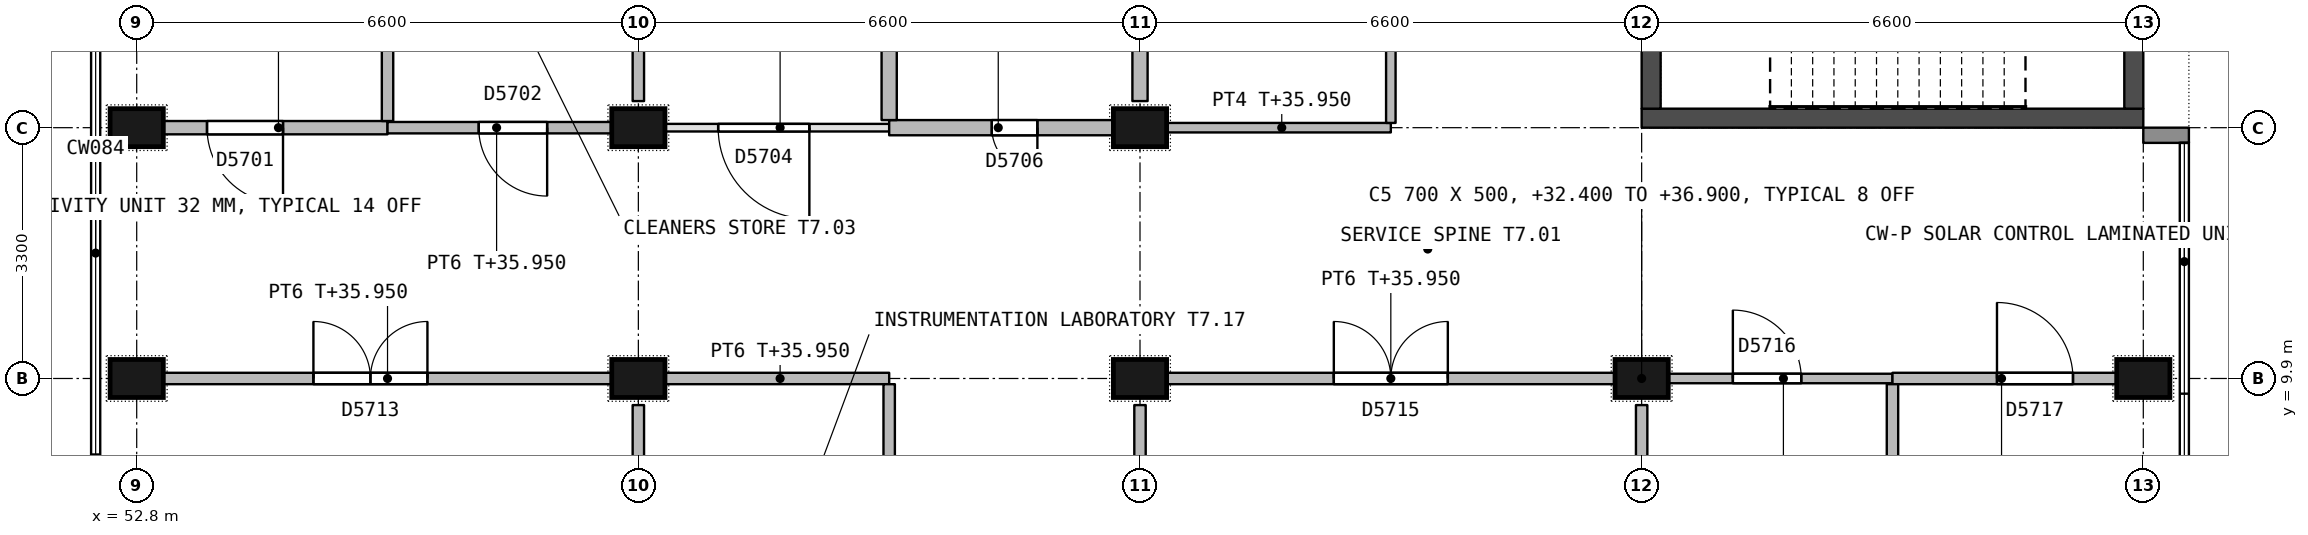
"""IFC4 building model, lengths in metres.
Left out: names, types, materials, properties, quantities, classifications, styles, units other than length and angle.
Written with IfcOpenShell. Run it as: python <this file> out.ifc"""

import sys

from ifc_helpers import new_model, si_unit, direction, frame, frame_2d, origin, origin_2d, place, context, subcontext, project, spatial, rectangle, extrude, element, fill, save


model = new_model("IFC4")
c1 = context("Model", 3, precision=1e-05, world=origin(), true_north=direction((0.0, 1.0)))
c2 = subcontext(c1, "Body", "Model", "MODEL_VIEW")
j1 = project(units=[si_unit("LENGTHUNIT", "METRE"), si_unit("PLANEANGLEUNIT", "RADIAN")], contexts=[c1])
p1 = place(None, origin())
s1 = spatial("IfcSite", under=j1, at=p1, CompositionType="ELEMENT")
p2 = place(p1, origin())
s2 = spatial("IfcBuilding", under=s1, at=p2, CompositionType="ELEMENT")
p3 = place(p2, frame((0.0, 0.0, 32.4)))
s3 = spatial("IfcBuildingStorey", under=s2, at=p3, CompositionType="ELEMENT", Elevation=32.4)
for number, where, z_axis, x_axis in (
    (1, (52.8, 9.9, 0.0), (0.0, 0.0, 1.0), (1.0, 0.0, 0.0)),
    (2, (52.8, 13.2, 0.0), (0.0, 0.0, 1.0), (1.0, 0.0, 0.0)),
    (3, (59.4, 9.9, 0.0), (0.0, 0.0, 1.0), (1.0, 0.0, 0.0)),
    (4, (59.4, 13.2, 0.0), (0.0, 0.0, 1.0), (1.0, 0.0, 0.0)),
    (5, (66.0, 9.9, 0.0), (0.0, 0.0, 1.0), (1.0, 0.0, 0.0)),
    (6, (66.0, 13.2, 0.0), (0.0, 0.0, 1.0), (1.0, 0.0, 0.0)),
    (7, (72.6, 9.9, 0.0), (0.0, 0.0, 1.0), (1.0, 0.0, 0.0)),
    (8, (79.2, 9.9, 0.0), (0.0, 0.0, 1.0), (1.0, 0.0, 0.0)),
):
    element("IfcColumn", number, at=place(p3, frame(where, z_axis=z_axis, x_axis=x_axis)), inside=s3, PredefinedType="COLUMN", context=c2, shape_type="SweptSolid", body=[
        extrude(rectangle(XDim=0.7, YDim=0.5, at=origin_2d()), origin(), (0.0, 0.0, 1.0), 4.5),
    ])
p4 = place(p3, frame((72.6, 13.325, 0.0), z_axis=(0.0, 0.0, 1.0), x_axis=(1.0, 0.0, 0.0)))
e9 = element("IfcWall", 9, at=p4, inside=s3, PredefinedType="SHEAR", context=c2, shape_type="SweptSolid", body=[
    extrude(rectangle(XDim=6.6, YDim=0.25, at=frame_2d((3.3, 0.0))), origin(), (0.0, 0.0, 1.0), 4.2),
])
p5 = place(p3, frame((72.725, 13.45, 0.0), z_axis=(0.0, 0.0, 1.0), x_axis=(0.0, 1.0, 0.0)))
e10 = element("IfcWall", 10, at=p5, inside=s3, PredefinedType="SHEAR", context=c2, shape_type="SweptSolid", body=[
    extrude(rectangle(XDim=9.4, YDim=0.25, at=frame_2d((4.7, 0.0))), origin(), (0.0, 0.0, 1.0), 4.2),
])
p6 = place(p5, frame((4.125, 0.0, 0.0)))
e11 = element("IfcOpeningElement", 11, at=p6, cuts=e10, PredefinedType="OPENING", context=c2, shape_type="SweptSolid", body=[
    extrude(rectangle(XDim=1.2, YDim=2.1, at=frame_2d((0.6, 1.05))), frame((0.0, 0.135, 0.0), z_axis=(0.0, -1.0, 0.0), x_axis=(1.0, 0.0, 0.0)), (0.0, 0.0, 1.0), 0.27),
])
p7 = place(p3, frame((79.075, 13.45, 0.0), z_axis=(0.0, 0.0, 1.0), x_axis=(0.0, 1.0, 0.0)))
e12 = element("IfcWall", 12, at=p7, inside=s3, PredefinedType="SHEAR", context=c2, shape_type="SweptSolid", body=[
    extrude(rectangle(XDim=9.4, YDim=0.25, at=frame_2d((4.7, 0.0))), origin(), (0.0, 0.0, 1.0), 4.2),
])
p8 = place(p7, frame((0.95, 0.0, 0.7)))
e13 = element("IfcOpeningElement", 13, at=p8, cuts=e12, PredefinedType="OPENING", context=c2, shape_type="SweptSolid", body=[
    extrude(rectangle(XDim=1.2, YDim=1.8, at=frame_2d((0.6, 0.9))), frame((0.0, 0.135, 0.0), z_axis=(0.0, -1.0, 0.0), x_axis=(1.0, 0.0, 0.0)), (0.0, 0.0, 1.0), 0.27),
])
p9 = place(p3, frame((79.2, 13.1, 0.0), z_axis=(0.0, 0.0, 1.0), x_axis=(1.0, 0.0, 0.0)))
e14 = element("IfcWall", 14, at=p9, inside=s3, PredefinedType="STANDARD", context=c2, shape_type="SweptSolid", body=[
    extrude(rectangle(XDim=0.6, YDim=0.2, at=frame_2d((0.3, 0.0))), origin(), (0.0, 0.0, 1.0), 3.55),
])
p10 = place(p3, frame((53.15, 13.2, 0.0), z_axis=(0.0, 0.0, 1.0), x_axis=(1.0, 0.0, 0.0)))
e15 = element("IfcWall", 15, at=p10, inside=s3, PredefinedType="PARTITIONING", context=c2, shape_type="SweptSolid", body=[
    extrude(rectangle(XDim=2.95, YDim=0.175, at=frame_2d((1.475, 0.0))), origin(), (0.0, 0.0, 1.0), 3.55),
])
p11 = place(p10, frame((0.575, 0.0, 0.0)))
e16 = element("IfcOpeningElement", 16, at=p11, cuts=e15, PredefinedType="OPENING", context=c2, shape_type="SweptSolid", body=[
    extrude(rectangle(XDim=1.0, YDim=2.1, at=frame_2d((0.5, 1.05))), frame((0.0, 0.097, 0.0), z_axis=(0.0, -1.0, 0.0), x_axis=(1.0, 0.0, 0.0)), (0.0, 0.0, 1.0), 0.195),
])
p12 = place(p3, frame((59.05, 13.2, 0.0), z_axis=(0.0, 0.0, 1.0), x_axis=(-1.0, 0.0, 0.0)))
e17 = element("IfcWall", 17, at=p12, inside=s3, PredefinedType="PARTITIONING", context=c2, shape_type="SweptSolid", body=[
    extrude(rectangle(XDim=2.95, YDim=0.15, at=frame_2d((1.475, 0.0))), origin(), (0.0, 0.0, 1.0), 3.55),
])
p13 = place(p12, frame((0.85, 0.0, 0.0)))
e18 = element("IfcOpeningElement", 18, at=p13, cuts=e17, PredefinedType="OPENING", context=c2, shape_type="SweptSolid", body=[
    extrude(rectangle(XDim=0.9, YDim=2.1, at=frame_2d((0.45, 1.05))), frame((0.0, 0.085, 0.0), z_axis=(0.0, -1.0, 0.0), x_axis=(1.0, 0.0, 0.0)), (0.0, 0.0, 1.0), 0.17),
])
p14 = place(p3, frame((59.75, 13.2, 0.0), z_axis=(0.0, 0.0, 1.0), x_axis=(1.0, 0.0, 0.0)))
e19 = element("IfcWall", 19, at=p14, inside=s3, PredefinedType="PARTITIONING", context=c2, shape_type="SweptSolid", body=[
    extrude(rectangle(XDim=2.95, YDim=0.1, at=frame_2d((1.475, 0.0))), origin(), (0.0, 0.0, 1.0), 3.55),
])
p15 = place(p14, frame((0.7, 0.0, 0.0)))
e20 = element("IfcOpeningElement", 20, at=p15, cuts=e19, PredefinedType="OPENING", context=c2, shape_type="SweptSolid", body=[
    extrude(rectangle(XDim=1.2, YDim=2.1, at=frame_2d((0.6, 1.05))), frame((0.0, 0.06, 0.0), z_axis=(0.0, -1.0, 0.0), x_axis=(1.0, 0.0, 0.0)), (0.0, 0.0, 1.0), 0.12),
])
p16 = place(p3, frame((62.7, 13.2, 0.0), z_axis=(0.0, 0.0, 1.0), x_axis=(1.0, 0.0, 0.0)))
e21 = element("IfcWall", 21, at=p16, inside=s3, PredefinedType="PARTITIONING", context=c2, shape_type="SweptSolid", body=[
    extrude(rectangle(XDim=2.95, YDim=0.2, at=frame_2d((1.475, 0.0))), origin(), (0.0, 0.0, 1.0), 3.55),
])
p17 = place(p16, frame((1.35, 0.0, 0.0)))
e22 = element("IfcOpeningElement", 22, at=p17, cuts=e21, PredefinedType="OPENING", context=c2, shape_type="SweptSolid", body=[
    extrude(rectangle(XDim=0.6, YDim=2.1, at=frame_2d((0.3, 1.05))), frame((0.0, 0.11, 0.0), z_axis=(0.0, -1.0, 0.0), x_axis=(1.0, 0.0, 0.0)), (0.0, 0.0, 1.0), 0.22),
])
p18 = place(p3, frame((69.3, 13.2, 0.0), z_axis=(0.0, 0.0, 1.0), x_axis=(-1.0, 0.0, 0.0)))
e23 = element("IfcWall", 23, at=p18, inside=s3, PredefinedType="PARTITIONING", context=c2, shape_type="SweptSolid", body=[
    extrude(rectangle(XDim=2.95, YDim=0.125, at=frame_2d((1.475, 0.0))), origin(), (0.0, 0.0, 1.0), 3.55),
])
p19 = place(p3, frame((53.15, 9.9, 0.0), z_axis=(0.0, 0.0, 1.0), x_axis=(1.0, 0.0, 0.0)))
e24 = element("IfcWall", 24, at=p19, inside=s3, PredefinedType="PARTITIONING", context=c2, shape_type="SweptSolid", body=[
    extrude(rectangle(XDim=5.9, YDim=0.15, at=frame_2d((2.95, 0.0))), origin(), (0.0, 0.0, 1.0), 3.55),
])
p20 = place(p19, frame((1.975, 0.0, 0.0)))
e25 = element("IfcOpeningElement", 25, at=p20, cuts=e24, PredefinedType="OPENING", context=c2, shape_type="SweptSolid", body=[
    extrude(rectangle(XDim=1.5, YDim=2.1, at=frame_2d((0.75, 1.05))), frame((0.0, 0.085, 0.0), z_axis=(0.0, -1.0, 0.0), x_axis=(1.0, 0.0, 0.0)), (0.0, 0.0, 1.0), 0.17),
])
p21 = place(p3, frame((59.75, 9.9, 0.0), z_axis=(0.0, 0.0, 1.0), x_axis=(1.0, 0.0, 0.0)))
e26 = element("IfcWall", 26, at=p21, inside=s3, PredefinedType="PARTITIONING", context=c2, shape_type="SweptSolid", body=[
    extrude(rectangle(XDim=2.95, YDim=0.15, at=frame_2d((1.475, 0.0))), origin(), (0.0, 0.0, 1.0), 3.55),
])
p22 = place(p3, frame((66.35, 9.9, 0.0), z_axis=(0.0, 0.0, 1.0), x_axis=(1.0, 0.0, 0.0)))
e27 = element("IfcWall", 27, at=p22, inside=s3, PredefinedType="PARTITIONING", context=c2, shape_type="SweptSolid", body=[
    extrude(rectangle(XDim=5.9, YDim=0.15, at=frame_2d((2.95, 0.0))), origin(), (0.0, 0.0, 1.0), 3.55),
])
p23 = place(p22, frame((2.2, 0.0, 0.0)))
e28 = element("IfcOpeningElement", 28, at=p23, cuts=e27, PredefinedType="OPENING", context=c2, shape_type="SweptSolid", body=[
    extrude(rectangle(XDim=1.5, YDim=2.1, at=frame_2d((0.75, 1.05))), frame((0.0, 0.085, 0.0), z_axis=(0.0, -1.0, 0.0), x_axis=(1.0, 0.0, 0.0)), (0.0, 0.0, 1.0), 0.17),
])
p24 = place(p3, frame((75.9, 9.9, 0.0), z_axis=(0.0, 0.0, 1.0), x_axis=(-1.0, 0.0, 0.0)))
e29 = element("IfcWall", 29, at=p24, inside=s3, PredefinedType="PARTITIONING", context=c2, shape_type="SweptSolid", body=[
    extrude(rectangle(XDim=2.95, YDim=0.125, at=frame_2d((1.475, 0.0))), origin(), (0.0, 0.0, 1.0), 3.55),
])
p25 = place(p24, frame((1.2, 0.0, 0.0)))
e30 = element("IfcOpeningElement", 30, at=p25, cuts=e29, PredefinedType="OPENING", context=c2, shape_type="SweptSolid", body=[
    extrude(rectangle(XDim=0.9, YDim=2.1, at=frame_2d((0.45, 1.05))), frame((0.0, 0.073, 0.0), z_axis=(0.0, -1.0, 0.0), x_axis=(1.0, 0.0, 0.0)), (0.0, 0.0, 1.0), 0.145),
])
p26 = place(p3, frame((75.9, 9.9, 0.0), z_axis=(0.0, 0.0, 1.0), x_axis=(1.0, 0.0, 0.0)))
e31 = element("IfcWall", 31, at=p26, inside=s3, PredefinedType="PARTITIONING", context=c2, shape_type="SweptSolid", body=[
    extrude(rectangle(XDim=2.95, YDim=0.15, at=frame_2d((1.475, 0.0))), origin(), (0.0, 0.0, 1.0), 3.55),
])
p27 = place(p26, frame((1.375, 0.0, 0.0)))
e32 = element("IfcOpeningElement", 32, at=p27, cuts=e31, PredefinedType="OPENING", context=c2, shape_type="SweptSolid", body=[
    extrude(rectangle(XDim=1.0, YDim=2.1, at=frame_2d((0.5, 1.05))), frame((0.0, 0.085, 0.0), z_axis=(0.0, -1.0, 0.0), x_axis=(1.0, 0.0, 0.0)), (0.0, 0.0, 1.0), 0.17),
])
p28 = place(p3, frame((56.1, 13.288, 0.0), z_axis=(0.0, 0.0, 1.0), x_axis=(0.0, 1.0, 0.0)))
e33 = element("IfcWall", 33, at=p28, inside=s3, PredefinedType="PARTITIONING", context=c2, shape_type="SweptSolid", body=[
    extrude(rectangle(XDim=3.212, YDim=0.15, at=frame_2d((1.606, 0.0))), origin(), (0.0, 0.0, 1.0), 4.2),
])
p29 = place(p3, frame((59.4, 13.55, 0.0), z_axis=(0.0, 0.0, 1.0), x_axis=(0.0, 1.0, 0.0)))
e34 = element("IfcWall", 34, at=p29, inside=s3, PredefinedType="PARTITIONING", context=c2, shape_type="SweptSolid", body=[
    extrude(rectangle(XDim=2.875, YDim=0.15, at=frame_2d((1.438, 0.0))), origin(), (0.0, 0.0, 1.0), 3.4),
])
p30 = place(p3, frame((62.7, 13.3, 0.0), z_axis=(0.0, 0.0, 1.0), x_axis=(0.0, 1.0, 0.0)))
e35 = element("IfcWall", 35, at=p30, inside=s3, PredefinedType="PARTITIONING", context=c2, shape_type="SweptSolid", body=[
    extrude(rectangle(XDim=3.2, YDim=0.2, at=frame_2d((1.6, 0.0))), origin(), (0.0, 0.0, 1.0), 4.2),
])
p31 = place(p3, frame((66.0, 13.55, 0.0), z_axis=(0.0, 0.0, 1.0), x_axis=(0.0, 1.0, 0.0)))
e36 = element("IfcWall", 36, at=p31, inside=s3, PredefinedType="PARTITIONING", context=c2, shape_type="SweptSolid", body=[
    extrude(rectangle(XDim=2.85, YDim=0.2, at=frame_2d((1.425, 0.0))), origin(), (0.0, 0.0, 1.0), 3.4),
])
p32 = place(p3, frame((69.3, 13.262, 0.0), z_axis=(0.0, 0.0, 1.0), x_axis=(0.0, 1.0, 0.0)))
e37 = element("IfcWall", 37, at=p32, inside=s3, PredefinedType="PARTITIONING", context=c2, shape_type="SweptSolid", body=[
    extrude(rectangle(XDim=10.288, YDim=0.125, at=frame_2d((5.144, 0.0))), origin(), (0.0, 0.0, 1.0), 4.2),
])
p33 = place(p32, frame((4.663, 0.0, 0.0)))
e38 = element("IfcOpeningElement", 38, at=p33, cuts=e37, PredefinedType="OPENING", context=c2, shape_type="SweptSolid", body=[
    extrude(rectangle(XDim=0.9, YDim=2.1, at=frame_2d((0.45, 1.05))), frame((0.0, 0.073, 0.0), z_axis=(0.0, -1.0, 0.0), x_axis=(1.0, 0.0, 0.0)), (0.0, 0.0, 1.0), 0.145),
])
p34 = place(p3, frame((59.4, 3.975, 0.0), z_axis=(0.0, 0.0, 1.0), x_axis=(0.0, 1.0, 0.0)))
e39 = element("IfcWall", 39, at=p34, inside=s3, PredefinedType="PARTITIONING", context=c2, shape_type="SweptSolid", body=[
    extrude(rectangle(XDim=5.575, YDim=0.15, at=frame_2d((2.788, 0.0))), origin(), (0.0, 0.0, 1.0), 3.4),
])
p35 = place(p3, frame((62.7, 9.825, 0.0), z_axis=(0.0, 0.0, 1.0), x_axis=(0.0, -1.0, 0.0)))
e40 = element("IfcWall", 40, at=p35, inside=s3, PredefinedType="PARTITIONING", context=c2, shape_type="SweptSolid", body=[
    extrude(rectangle(XDim=5.85, YDim=0.15, at=frame_2d((2.925, 0.0))), origin(), (0.0, 0.0, 1.0), 4.2),
])
p36 = place(p35, frame((2.425, 0.0, 0.0)))
e41 = element("IfcOpeningElement", 41, at=p36, cuts=e40, PredefinedType="OPENING", context=c2, shape_type="SweptSolid", body=[
    extrude(rectangle(XDim=1.0, YDim=2.1, at=frame_2d((0.5, 1.05))), frame((0.0, 0.085, 0.0), z_axis=(0.0, -1.0, 0.0), x_axis=(1.0, 0.0, 0.0)), (0.0, 0.0, 1.0), 0.17),
])
for number, where, z_axis, x_axis in (
    (42, (66.0, 3.975, 0.0), (0.0, 0.0, 1.0), (0.0, 1.0, 0.0)),
    (43, (72.6, 3.975, 0.0), (0.0, 0.0, 1.0), (0.0, 1.0, 0.0)),
):
    element("IfcWall", number, at=place(p3, frame(where, z_axis=z_axis, x_axis=x_axis)), inside=s3, PredefinedType="PARTITIONING", context=c2, shape_type="SweptSolid", body=[
        extrude(rectangle(XDim=5.575, YDim=0.15, at=frame_2d((2.788, 0.0))), origin(), (0.0, 0.0, 1.0), 3.4),
    ])
p37 = place(p3, frame((75.9, 3.962, 0.0), z_axis=(0.0, 0.0, 1.0), x_axis=(0.0, 1.0, 0.0)))
e44 = element("IfcWall", 44, at=p37, inside=s3, PredefinedType="PARTITIONING", context=c2, shape_type="SweptSolid", body=[
    extrude(rectangle(XDim=5.863, YDim=0.15, at=frame_2d((2.931, 0.0))), origin(), (0.0, 0.0, 1.0), 4.2),
])
p38 = place(p11, origin())
e45 = element("IfcDoor", 45, at=p38, inside=s3, OperationType="SINGLE_SWING_RIGHT", PredefinedType="DOOR", context=c2, shape_type="SweptSolid", body=[
    extrude(rectangle(XDim=1.0, YDim=2.1, at=frame_2d((0.5, 1.05))), frame((0.0, 0.027, 0.0), z_axis=(0.0, -1.0, 0.0), x_axis=(1.0, 0.0, 0.0)), (0.0, 0.0, 1.0), 0.054),
])
fill(e16, e45)
p39 = place(p13, origin())
e46 = element("IfcDoor", 46, at=p39, inside=s3, OperationType="SINGLE_SWING_LEFT", PredefinedType="DOOR", context=c2, shape_type="SweptSolid", body=[
    extrude(rectangle(XDim=0.9, YDim=2.1, at=frame_2d((0.45, 1.05))), frame((0.0, 0.027, 0.0), z_axis=(0.0, -1.0, 0.0), x_axis=(1.0, 0.0, 0.0)), (0.0, 0.0, 1.0), 0.054),
])
fill(e18, e46)
p40 = place(p15, origin())
e47 = element("IfcDoor", 47, at=p40, inside=s3, OperationType="SINGLE_SWING_RIGHT", PredefinedType="DOOR", context=c2, shape_type="SweptSolid", body=[
    extrude(rectangle(XDim=1.2, YDim=2.1, at=frame_2d((0.6, 1.05))), frame((0.0, 0.022, 0.0), z_axis=(0.0, -1.0, 0.0), x_axis=(1.0, 0.0, 0.0)), (0.0, 0.0, 1.0), 0.044),
])
fill(e20, e47)
p41 = place(p17, origin())
e48 = element("IfcDoor", 48, at=p41, inside=s3, OperationType="SINGLE_SWING_RIGHT", PredefinedType="DOOR", context=c2, shape_type="SweptSolid", body=[
    extrude(rectangle(XDim=0.6, YDim=2.1, at=frame_2d((0.3, 1.05))), frame((0.0, 0.03, 0.0), z_axis=(0.0, -1.0, 0.0), x_axis=(1.0, 0.0, 0.0)), (0.0, 0.0, 1.0), 0.06),
])
fill(e22, e48)
p42 = place(p20, origin())
e49 = element("IfcDoor", 49, at=p42, inside=s3, OperationType="DOUBLE_DOOR_SINGLE_SWING", PredefinedType="DOOR", context=c2, shape_type="SweptSolid", body=[
    extrude(rectangle(XDim=1.5, YDim=2.1, at=frame_2d((0.75, 1.05))), frame((0.0, 0.027, 0.0), z_axis=(0.0, -1.0, 0.0), x_axis=(1.0, 0.0, 0.0)), (0.0, 0.0, 1.0), 0.054),
])
fill(e25, e49)
p43 = place(p23, origin())
e50 = element("IfcDoor", 50, at=p43, inside=s3, OperationType="DOUBLE_DOOR_SINGLE_SWING", PredefinedType="DOOR", context=c2, shape_type="SweptSolid", body=[
    extrude(rectangle(XDim=1.5, YDim=2.1, at=frame_2d((0.75, 1.05))), frame((0.0, 0.027, 0.0), z_axis=(0.0, -1.0, 0.0), x_axis=(1.0, 0.0, 0.0)), (0.0, 0.0, 1.0), 0.054),
])
fill(e28, e50)
p44 = place(p25, origin())
e51 = element("IfcDoor", 51, at=p44, inside=s3, OperationType="SINGLE_SWING_RIGHT", PredefinedType="DOOR", context=c2, shape_type="SweptSolid", body=[
    extrude(rectangle(XDim=0.9, YDim=2.1, at=frame_2d((0.45, 1.05))), frame((0.0, 0.027, 0.0), z_axis=(0.0, -1.0, 0.0), x_axis=(1.0, 0.0, 0.0)), (0.0, 0.0, 1.0), 0.054),
])
fill(e30, e51)
p45 = place(p27, origin())
e52 = element("IfcDoor", 52, at=p45, inside=s3, OperationType="SINGLE_SWING_LEFT", PredefinedType="DOOR", context=c2, shape_type="SweptSolid", body=[
    extrude(rectangle(XDim=1.0, YDim=2.1, at=frame_2d((0.5, 1.05))), frame((0.0, 0.027, 0.0), z_axis=(0.0, -1.0, 0.0), x_axis=(1.0, 0.0, 0.0)), (0.0, 0.0, 1.0), 0.054),
])
fill(e32, e52)
save(model, sys.argv[1])
